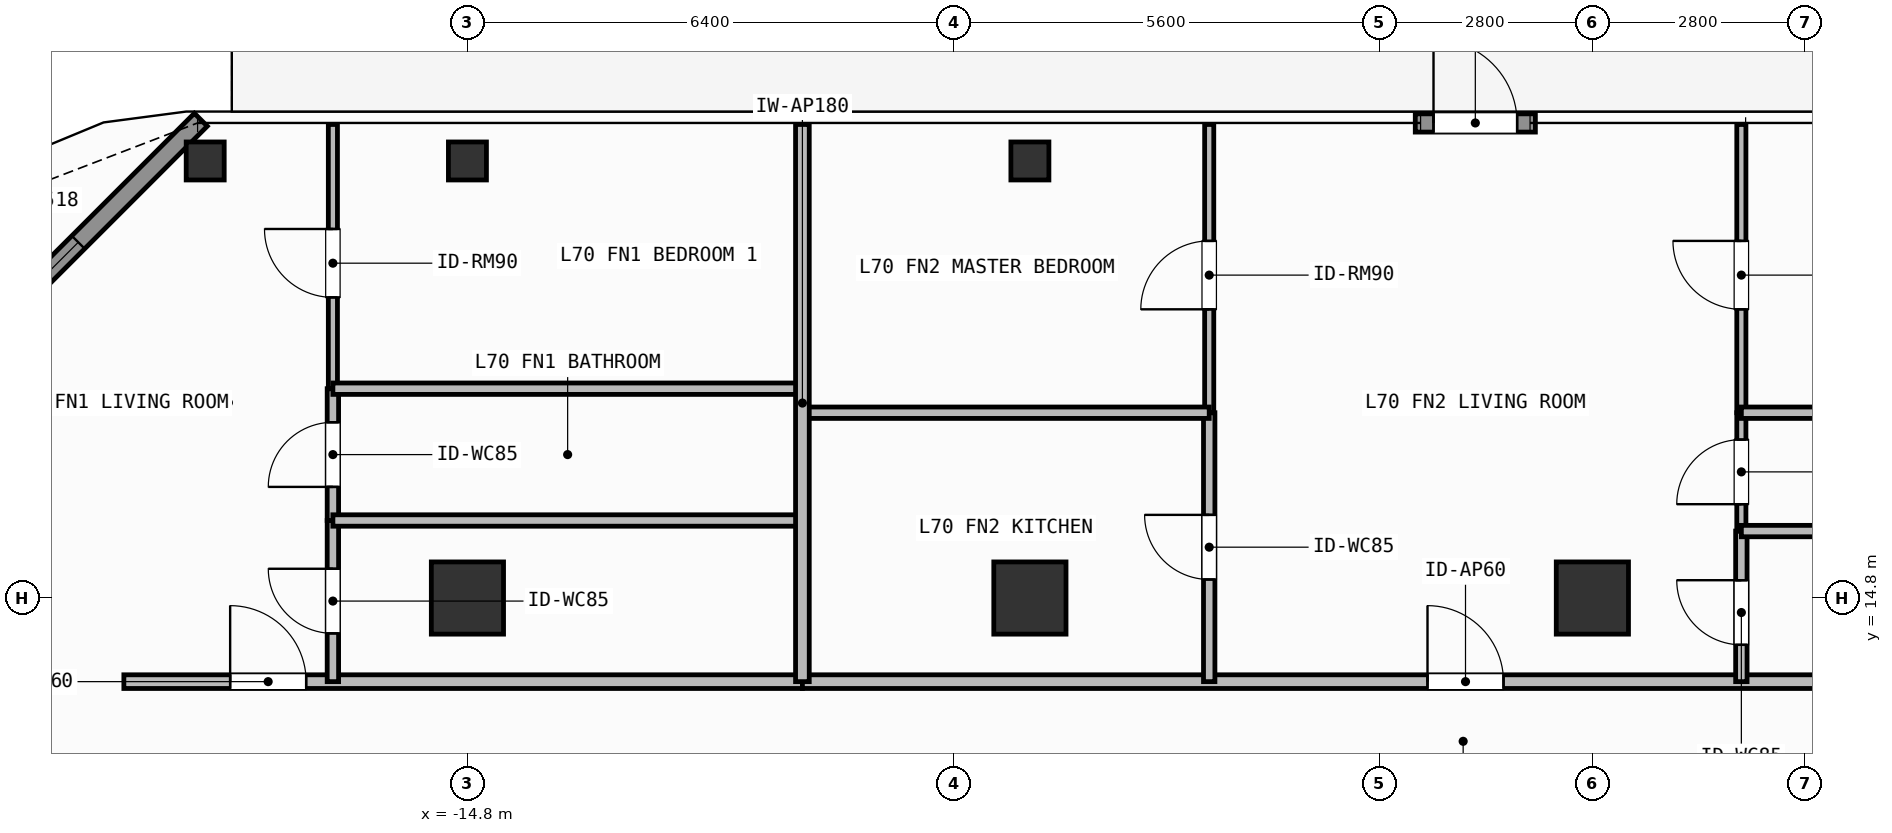
"""IFC4 building model, lengths in metres.
Left out: names, types, materials, properties, quantities, classifications, styles, units other than length and angle.
Written with IfcOpenShell. Run it as: python <this file> out.ifc"""

import sys

from ifc_helpers import new_model, si_unit, direction, frame, frame_2d, origin, origin_2d, place, context, subcontext, project, spatial, rectangle, hollow_rectangle, extrude, element, fill, save


model = new_model("IFC4")
c1 = context("Model", 3, precision=1e-05, world=origin(), true_north=direction((0.0, 1.0)))
c2 = subcontext(c1, "Body", "Model", "MODEL_VIEW")
j1 = project(units=[si_unit("LENGTHUNIT", "METRE"), si_unit("PLANEANGLEUNIT", "RADIAN")], contexts=[c1])
p1 = place(None, origin())
s1 = spatial("IfcSite", under=j1, at=p1, CompositionType="ELEMENT")
p2 = place(p1, origin())
s2 = spatial("IfcBuilding", under=s1, at=p2, CompositionType="ELEMENT")
p3 = place(p2, frame((0.0, 0.0, 285.9)))
s3 = spatial("IfcBuildingStorey", under=s2, at=p3, CompositionType="ELEMENT", Elevation=285.9)
for number, where, z_axis, x_axis in (
    (1, (-14.8, 14.8, 0.0), (0.0, 0.0, 1.0), (1.0, 0.0, 0.0)),
    (2, (-7.4, 14.8, 0.0), (0.0, 0.0, 1.0), (1.0, 0.0, 0.0)),
    (3, (0.0, 14.8, 0.0), (0.0, 0.0, 1.0), (1.0, 0.0, 0.0)),
):
    element("IfcColumn", number, at=place(p3, frame(where, z_axis=z_axis, x_axis=x_axis)), inside=s3, PredefinedType="COLUMN", context=c2, shape_type="SweptSolid", body=[
        extrude(rectangle(XDim=0.95, YDim=0.95, at=origin_2d()), origin(), (0.0, 0.0, 1.0), 3.9),
    ])
for number, where, z_axis, x_axis in (
    (4, (-18.25, 20.55, 0.0), (0.0, 0.0, 1.0), (1.0, 0.0, 0.0)),
    (5, (-14.8, 20.55, 0.0), (0.0, 0.0, 1.0), (1.0, 0.0, 0.0)),
    (6, (-7.4, 20.55, 0.0), (0.0, 0.0, 1.0), (1.0, 0.0, 0.0)),
):
    element("IfcColumn", number, at=place(p3, frame(where, z_axis=z_axis, x_axis=x_axis)), inside=s3, PredefinedType="COLUMN", context=c2, shape_type="SweptSolid", body=[
        extrude(hollow_rectangle(XDim=0.5, YDim=0.5, WallThickness=0.025, at=origin_2d()), origin(), (0.0, 0.0, 1.0), 3.9),
    ])
p4 = place(p3, frame((-2.33, 21.05, 0.0), z_axis=(0.0, 0.0, 1.0), x_axis=(1.0, 0.0, 0.0)))
e7 = element("IfcWall", 7, at=p4, inside=s3, PredefinedType="SOLIDWALL", context=c2, shape_type="SweptSolid", body=[
    extrude(rectangle(XDim=1.58, YDim=0.24, at=frame_2d((0.79, 0.0))), origin(), (0.0, 0.0, 1.0), 3.68),
])
p5 = place(p4, frame((0.24, 0.0, 0.0)))
e8 = element("IfcOpeningElement", 8, at=p5, cuts=e7, PredefinedType="OPENING", context=c2, shape_type="SweptSolid", body=[
    extrude(rectangle(XDim=1.1, YDim=2.2, at=frame_2d((0.55, 1.1))), frame((0.0, 0.13, 0.0), z_axis=(0.0, -1.0, 0.0), x_axis=(1.0, 0.0, 0.0)), (0.0, 0.0, 1.0), 0.26),
])
p6 = place(p3, frame((-22.592, 16.808, 0.0), z_axis=(0.0, 0.0, 1.0), x_axis=(0.707106781187, 0.707106781187, 0.0)))
e9 = element("IfcWall", 9, at=p6, inside=s3, PredefinedType="SOLIDWALL", context=c2, shape_type="SweptSolid", body=[
    extrude(rectangle(XDim=6.059, YDim=0.24, at=frame_2d((3.03, 0.0))), origin(), (0.0, 0.0, 1.0), 3.68),
])
p7 = place(p6, frame((2.28, 0.0, 0.8)))
e10 = element("IfcOpeningElement", 10, at=p7, cuts=e9, PredefinedType="OPENING", context=c2, shape_type="SweptSolid", body=[
    extrude(rectangle(XDim=1.5, YDim=1.85, at=frame_2d((0.75, 0.925))), frame((0.0, 0.13, 0.0), z_axis=(0.0, -1.0, 0.0), x_axis=(1.0, 0.0, 0.0)), (0.0, 0.0, 1.0), 0.26),
])
p8 = place(p3, frame((-19.32, 13.7, 0.0), z_axis=(0.0, 0.0, 1.0), x_axis=(1.0, 0.0, 0.0)))
e11 = element("IfcWall", 11, at=p8, inside=s3, PredefinedType="PARTITIONING", context=c2, shape_type="SweptSolid", body=[
    extrude(rectangle(XDim=8.927, YDim=0.18, at=frame_2d((4.463, 0.0))), origin(), (0.0, 0.0, 1.0), 3.68),
])
p9 = place(p8, frame((1.398, 0.0, 0.0)))
e12 = element("IfcOpeningElement", 12, at=p9, cuts=e11, PredefinedType="OPENING", context=c2, shape_type="SweptSolid", body=[
    extrude(rectangle(XDim=1.0, YDim=2.2, at=frame_2d((0.5, 1.1))), frame((0.0, 0.1, 0.0), z_axis=(0.0, -1.0, 0.0), x_axis=(1.0, 0.0, 0.0)), (0.0, 0.0, 1.0), 0.2),
])
p10 = place(p3, frame((-16.57, 13.7, 0.0), z_axis=(0.0, 0.0, 1.0), x_axis=(0.0, 1.0, 0.0)))
e13 = element("IfcWall", 13, at=p10, inside=s3, PredefinedType="PARTITIONING", context=c2, shape_type="SweptSolid", body=[
    extrude(rectangle(XDim=2.12, YDim=0.15, at=frame_2d((1.06, 0.0))), origin(), (0.0, 0.0, 1.0), 3.68),
])
p11 = place(p10, frame((0.635, 0.0, 0.0)))
e14 = element("IfcOpeningElement", 14, at=p11, cuts=e13, PredefinedType="OPENING", context=c2, shape_type="SweptSolid", body=[
    extrude(rectangle(XDim=0.85, YDim=2.1, at=frame_2d((0.425, 1.05))), frame((0.0, 0.085, 0.0), z_axis=(0.0, -1.0, 0.0), x_axis=(1.0, 0.0, 0.0)), (0.0, 0.0, 1.0), 0.17),
])
p12 = place(p3, frame((-16.57, 15.82, 0.0), z_axis=(0.0, 0.0, 1.0), x_axis=(0.0, 1.0, 0.0)))
e15 = element("IfcWall", 15, at=p12, inside=s3, PredefinedType="PARTITIONING", context=c2, shape_type="SweptSolid", body=[
    extrude(rectangle(XDim=1.734, YDim=0.15, at=frame_2d((0.867, 0.0))), origin(), (0.0, 0.0, 1.0), 3.68),
])
p13 = place(p12, frame((0.442, 0.0, 0.0)))
e16 = element("IfcOpeningElement", 16, at=p13, cuts=e15, PredefinedType="OPENING", context=c2, shape_type="SweptSolid", body=[
    extrude(rectangle(XDim=0.85, YDim=2.1, at=frame_2d((0.425, 1.05))), frame((0.0, 0.085, 0.0), z_axis=(0.0, -1.0, 0.0), x_axis=(1.0, 0.0, 0.0)), (0.0, 0.0, 1.0), 0.17),
])
p14 = place(p3, frame((-16.57, 17.554, 0.0), z_axis=(0.0, 0.0, 1.0), x_axis=(0.0, 1.0, 0.0)))
e17 = element("IfcWall", 17, at=p14, inside=s3, PredefinedType="PARTITIONING", context=c2, shape_type="SweptSolid", body=[
    extrude(rectangle(XDim=3.476, YDim=0.12, at=frame_2d((1.738, 0.0))), origin(), (0.0, 0.0, 1.0), 3.68),
])
p15 = place(p14, frame((1.201, 0.0, 0.0)))
e18 = element("IfcOpeningElement", 18, at=p15, cuts=e17, PredefinedType="OPENING", context=c2, shape_type="SweptSolid", body=[
    extrude(rectangle(XDim=0.9, YDim=2.1, at=frame_2d((0.45, 1.05))), frame((0.0, 0.07, 0.0), z_axis=(0.0, -1.0, 0.0), x_axis=(1.0, 0.0, 0.0)), (0.0, 0.0, 1.0), 0.14),
])
p16 = place(p3, frame((-10.393, 13.7, 0.0), z_axis=(0.0, 0.0, 1.0), x_axis=(1.0, 0.0, 0.0)))
e19 = element("IfcWall", 19, at=p16, inside=s3, PredefinedType="PARTITIONING", context=c2, shape_type="SweptSolid", body=[
    extrude(rectangle(XDim=15.835, YDim=0.18, at=frame_2d((7.917, 0.0))), origin(), (0.0, 0.0, 1.0), 3.68),
])
p17 = place(p16, frame((8.224, 0.0, 0.0)))
e20 = element("IfcOpeningElement", 20, at=p17, cuts=e19, PredefinedType="OPENING", context=c2, shape_type="SweptSolid", body=[
    extrude(rectangle(XDim=1.0, YDim=2.2, at=frame_2d((0.5, 1.1))), frame((0.0, 0.1, 0.0), z_axis=(0.0, -1.0, 0.0), x_axis=(1.0, 0.0, 0.0)), (0.0, 0.0, 1.0), 0.2),
])
p18 = place(p3, frame((-5.041, 13.7, 0.0), z_axis=(0.0, 0.0, 1.0), x_axis=(0.0, 1.0, 0.0)))
e21 = element("IfcWall", 21, at=p18, inside=s3, PredefinedType="PARTITIONING", context=c2, shape_type="SweptSolid", body=[
    extrude(rectangle(XDim=3.538, YDim=0.15, at=frame_2d((1.769, 0.0))), origin(), (0.0, 0.0, 1.0), 3.68),
])
p19 = place(p18, frame((1.344, 0.0, 0.0)))
e22 = element("IfcOpeningElement", 22, at=p19, cuts=e21, PredefinedType="OPENING", context=c2, shape_type="SweptSolid", body=[
    extrude(rectangle(XDim=0.85, YDim=2.1, at=frame_2d((0.425, 1.05))), frame((0.0, 0.085, 0.0), z_axis=(0.0, -1.0, 0.0), x_axis=(1.0, 0.0, 0.0)), (0.0, 0.0, 1.0), 0.17),
])
p20 = place(p3, frame((-5.041, 17.238, 0.0), z_axis=(0.0, 0.0, 1.0), x_axis=(0.0, 1.0, 0.0)))
e23 = element("IfcWall", 23, at=p20, inside=s3, PredefinedType="PARTITIONING", context=c2, shape_type="SweptSolid", body=[
    extrude(rectangle(XDim=3.792, YDim=0.12, at=frame_2d((1.896, 0.0))), origin(), (0.0, 0.0, 1.0), 3.68),
])
p21 = place(p20, frame((1.36, 0.0, 0.0)))
e24 = element("IfcOpeningElement", 24, at=p21, cuts=e23, PredefinedType="OPENING", context=c2, shape_type="SweptSolid", body=[
    extrude(rectangle(XDim=0.9, YDim=2.1, at=frame_2d((0.45, 1.05))), frame((0.0, 0.07, 0.0), z_axis=(0.0, -1.0, 0.0), x_axis=(1.0, 0.0, 0.0)), (0.0, 0.0, 1.0), 0.14),
])
p22 = place(p3, frame((1.96, 13.7, 0.0), z_axis=(0.0, 0.0, 1.0), x_axis=(0.0, 1.0, 0.0)))
e25 = element("IfcWall", 25, at=p22, inside=s3, PredefinedType="PARTITIONING", context=c2, shape_type="SweptSolid", body=[
    extrude(rectangle(XDim=1.981, YDim=0.15, at=frame_2d((0.99, 0.0))), origin(), (0.0, 0.0, 1.0), 3.68),
])
p23 = place(p22, frame((0.484, 0.0, 0.0)))
e26 = element("IfcOpeningElement", 26, at=p23, cuts=e25, PredefinedType="OPENING", context=c2, shape_type="SweptSolid", body=[
    extrude(rectangle(XDim=0.85, YDim=2.1, at=frame_2d((0.425, 1.05))), frame((0.0, 0.085, 0.0), z_axis=(0.0, -1.0, 0.0), x_axis=(1.0, 0.0, 0.0)), (0.0, 0.0, 1.0), 0.17),
])
p24 = place(p3, frame((1.96, 15.681, 0.0), z_axis=(0.0, 0.0, 1.0), x_axis=(0.0, 1.0, 0.0)))
e27 = element("IfcWall", 27, at=p24, inside=s3, PredefinedType="PARTITIONING", context=c2, shape_type="SweptSolid", body=[
    extrude(rectangle(XDim=1.557, YDim=0.12, at=frame_2d((0.779, 0.0))), origin(), (0.0, 0.0, 1.0), 3.68),
])
p25 = place(p24, frame((0.354, 0.0, 0.0)))
e28 = element("IfcOpeningElement", 28, at=p25, cuts=e27, PredefinedType="OPENING", context=c2, shape_type="SweptSolid", body=[
    extrude(rectangle(XDim=0.85, YDim=2.1, at=frame_2d((0.425, 1.05))), frame((0.0, 0.07, 0.0), z_axis=(0.0, -1.0, 0.0), x_axis=(1.0, 0.0, 0.0)), (0.0, 0.0, 1.0), 0.14),
])
p26 = place(p3, frame((1.96, 17.238, 0.0), z_axis=(0.0, 0.0, 1.0), x_axis=(0.0, 1.0, 0.0)))
e29 = element("IfcWall", 29, at=p26, inside=s3, PredefinedType="PARTITIONING", context=c2, shape_type="SweptSolid", body=[
    extrude(rectangle(XDim=3.792, YDim=0.12, at=frame_2d((1.896, 0.0))), origin(), (0.0, 0.0, 1.0), 3.68),
])
p27 = place(p26, frame((1.36, 0.0, 0.0)))
e30 = element("IfcOpeningElement", 30, at=p27, cuts=e29, PredefinedType="OPENING", context=c2, shape_type="SweptSolid", body=[
    extrude(rectangle(XDim=0.9, YDim=2.1, at=frame_2d((0.45, 1.05))), frame((0.0, 0.07, 0.0), z_axis=(0.0, -1.0, 0.0), x_axis=(1.0, 0.0, 0.0)), (0.0, 0.0, 1.0), 0.14),
])
for number, where, z_axis, x_axis in (
    (31, (-16.57, 15.82, 0.0), (0.0, 0.0, 1.0), (1.0, 0.0, 0.0)),
    (32, (-16.57, 17.554, 0.0), (0.0, 0.0, 1.0), (1.0, 0.0, 0.0)),
):
    element("IfcWall", number, at=place(p3, frame(where, z_axis=z_axis, x_axis=x_axis)), inside=s3, PredefinedType="PARTITIONING", context=c2, shape_type="SweptSolid", body=[
        extrude(rectangle(XDim=6.177, YDim=0.15, at=frame_2d((3.088, 0.0))), origin(), (0.0, 0.0, 1.0), 3.68),
    ])
p28 = place(p3, frame((-10.393, 17.238, 0.0), z_axis=(0.0, 0.0, 1.0), x_axis=(1.0, 0.0, 0.0)))
e33 = element("IfcWall", 33, at=p28, inside=s3, PredefinedType="PARTITIONING", context=c2, shape_type="SweptSolid", body=[
    extrude(rectangle(XDim=5.352, YDim=0.15, at=frame_2d((2.676, 0.0))), origin(), (0.0, 0.0, 1.0), 3.68),
])
for number, where, z_axis, x_axis in (
    (34, (1.96, 15.681, 0.0), (0.0, 0.0, 1.0), (1.0, 0.0, 0.0)),
    (35, (1.96, 17.238, 0.0), (0.0, 0.0, 1.0), (1.0, 0.0, 0.0)),
):
    element("IfcWall", number, at=place(p3, frame(where, z_axis=z_axis, x_axis=x_axis)), inside=s3, PredefinedType="PARTITIONING", context=c2, shape_type="SweptSolid", body=[
        extrude(rectangle(XDim=3.482, YDim=0.15, at=frame_2d((1.741, 0.0))), origin(), (0.0, 0.0, 1.0), 3.68),
    ])
p29 = place(p3, frame((-10.393, 13.7, 0.0), z_axis=(0.0, 0.0, 1.0), x_axis=(0.0, 1.0, 0.0)))
e36 = element("IfcWall", 36, at=p29, inside=s3, PredefinedType="PARTITIONING", context=c2, shape_type="SweptSolid", body=[
    extrude(rectangle(XDim=7.33, YDim=0.18, at=frame_2d((3.665, 0.0))), origin(), (0.0, 0.0, 1.0), 3.68),
])
p30 = place(p5, origin())
e37 = element("IfcDoor", 37, at=p30, inside=s3, OperationType="SINGLE_SWING_LEFT", PredefinedType="DOOR", context=c2, shape_type="SweptSolid", body=[
    extrude(rectangle(XDim=1.1, YDim=2.2, at=frame_2d((0.55, 1.1))), frame((0.0, 0.025, 0.0), z_axis=(0.0, -1.0, 0.0), x_axis=(1.0, 0.0, 0.0)), (0.0, 0.0, 1.0), 0.05),
])
fill(e8, e37)
p31 = place(p7, origin())
e38 = element("IfcWindow", 38, at=p31, inside=s3, PartitioningType="SINGLE_PANEL", PredefinedType="WINDOW", context=c2, shape_type="SweptSolid", body=[
    extrude(rectangle(XDim=1.5, YDim=1.85, at=frame_2d((0.75, 0.925))), frame((0.0, 0.03, 0.0), z_axis=(0.0, -1.0, 0.0), x_axis=(1.0, 0.0, 0.0)), (0.0, 0.0, 1.0), 0.06),
])
fill(e10, e38)
p32 = place(p9, origin())
e39 = element("IfcDoor", 39, at=p32, inside=s3, OperationType="SINGLE_SWING_LEFT", PredefinedType="DOOR", context=c2, shape_type="SweptSolid", body=[
    extrude(rectangle(XDim=1.0, YDim=2.2, at=frame_2d((0.5, 1.1))), frame((0.0, 0.025, 0.0), z_axis=(0.0, -1.0, 0.0), x_axis=(1.0, 0.0, 0.0)), (0.0, 0.0, 1.0), 0.05),
])
fill(e12, e39)
p33 = place(p11, origin())
e40 = element("IfcDoor", 40, at=p33, inside=s3, OperationType="SINGLE_SWING_RIGHT", PredefinedType="DOOR", context=c2, shape_type="SweptSolid", body=[
    extrude(rectangle(XDim=0.85, YDim=2.1, at=frame_2d((0.425, 1.05))), frame((0.0, 0.025, 0.0), z_axis=(0.0, -1.0, 0.0), x_axis=(1.0, 0.0, 0.0)), (0.0, 0.0, 1.0), 0.05),
])
fill(e14, e40)
p34 = place(p13, origin())
e41 = element("IfcDoor", 41, at=p34, inside=s3, OperationType="SINGLE_SWING_LEFT", PredefinedType="DOOR", context=c2, shape_type="SweptSolid", body=[
    extrude(rectangle(XDim=0.85, YDim=2.1, at=frame_2d((0.425, 1.05))), frame((0.0, 0.025, 0.0), z_axis=(0.0, -1.0, 0.0), x_axis=(1.0, 0.0, 0.0)), (0.0, 0.0, 1.0), 0.05),
])
fill(e16, e41)
p35 = place(p15, origin())
e42 = element("IfcDoor", 42, at=p35, inside=s3, OperationType="SINGLE_SWING_RIGHT", PredefinedType="DOOR", context=c2, shape_type="SweptSolid", body=[
    extrude(rectangle(XDim=0.9, YDim=2.1, at=frame_2d((0.45, 1.05))), frame((0.0, 0.025, 0.0), z_axis=(0.0, -1.0, 0.0), x_axis=(1.0, 0.0, 0.0)), (0.0, 0.0, 1.0), 0.05),
])
fill(e18, e42)
p36 = place(p17, origin())
e43 = element("IfcDoor", 43, at=p36, inside=s3, OperationType="SINGLE_SWING_LEFT", PredefinedType="DOOR", context=c2, shape_type="SweptSolid", body=[
    extrude(rectangle(XDim=1.0, YDim=2.2, at=frame_2d((0.5, 1.1))), frame((0.0, 0.025, 0.0), z_axis=(0.0, -1.0, 0.0), x_axis=(1.0, 0.0, 0.0)), (0.0, 0.0, 1.0), 0.05),
])
fill(e20, e43)
p37 = place(p19, origin())
e44 = element("IfcDoor", 44, at=p37, inside=s3, OperationType="SINGLE_SWING_RIGHT", PredefinedType="DOOR", context=c2, shape_type="SweptSolid", body=[
    extrude(rectangle(XDim=0.85, YDim=2.1, at=frame_2d((0.425, 1.05))), frame((0.0, 0.025, 0.0), z_axis=(0.0, -1.0, 0.0), x_axis=(1.0, 0.0, 0.0)), (0.0, 0.0, 1.0), 0.05),
])
fill(e22, e44)
p38 = place(p21, origin())
e45 = element("IfcDoor", 45, at=p38, inside=s3, OperationType="SINGLE_SWING_LEFT", PredefinedType="DOOR", context=c2, shape_type="SweptSolid", body=[
    extrude(rectangle(XDim=0.9, YDim=2.1, at=frame_2d((0.45, 1.05))), frame((0.0, 0.025, 0.0), z_axis=(0.0, -1.0, 0.0), x_axis=(1.0, 0.0, 0.0)), (0.0, 0.0, 1.0), 0.05),
])
fill(e24, e45)
p39 = place(p23, origin())
e46 = element("IfcDoor", 46, at=p39, inside=s3, OperationType="SINGLE_SWING_RIGHT", PredefinedType="DOOR", context=c2, shape_type="SweptSolid", body=[
    extrude(rectangle(XDim=0.85, YDim=2.1, at=frame_2d((0.425, 1.05))), frame((0.0, 0.025, 0.0), z_axis=(0.0, -1.0, 0.0), x_axis=(1.0, 0.0, 0.0)), (0.0, 0.0, 1.0), 0.05),
])
fill(e26, e46)
p40 = place(p25, origin())
e47 = element("IfcDoor", 47, at=p40, inside=s3, OperationType="SINGLE_SWING_LEFT", PredefinedType="DOOR", context=c2, shape_type="SweptSolid", body=[
    extrude(rectangle(XDim=0.85, YDim=2.1, at=frame_2d((0.425, 1.05))), frame((0.0, 0.025, 0.0), z_axis=(0.0, -1.0, 0.0), x_axis=(1.0, 0.0, 0.0)), (0.0, 0.0, 1.0), 0.05),
])
fill(e28, e47)
p41 = place(p27, origin())
e48 = element("IfcDoor", 48, at=p41, inside=s3, OperationType="SINGLE_SWING_RIGHT", PredefinedType="DOOR", context=c2, shape_type="SweptSolid", body=[
    extrude(rectangle(XDim=0.9, YDim=2.1, at=frame_2d((0.45, 1.05))), frame((0.0, 0.025, 0.0), z_axis=(0.0, -1.0, 0.0), x_axis=(1.0, 0.0, 0.0)), (0.0, 0.0, 1.0), 0.05),
])
fill(e30, e48)
save(model, sys.argv[1])
